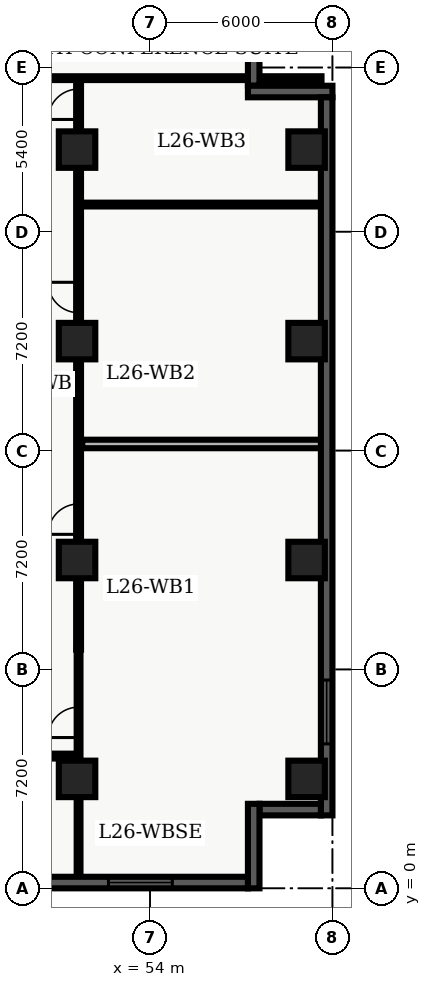
"""IFC4 building model, lengths in metres.
Left out: names, types, materials, properties, quantities, classifications, styles, units other than length and angle.
Written with IfcOpenShell. Run it as: python <this file> out.ifc"""

import sys

from ifc_helpers import new_model, entity, si_unit, converted_unit, direction, frame, origin_with_axes, origin_2d_with_axis, place, context, subcontext, project, spatial, polyline, rectangle, outline, extrude, element, fill, save


model = new_model("IFC4")
c1 = context("Model", 3, precision=1e-05, world=origin_with_axes(), true_north=direction((0.0, 1.0)))
c2 = subcontext(c1, "Body", "Model", "MODEL_VIEW")
j1 = project(units=[si_unit("LENGTHUNIT", "METRE"), converted_unit("PLANEANGLEUNIT", "DEGREE", entity("IfcPlaneAngleMeasure", 0.017), si_unit("PLANEANGLEUNIT", "RADIAN"), dimensions=[0, 0, 0, 0, 0, 0, 0])], contexts=[c1])
p1 = place(None, origin_with_axes())
s1 = spatial("IfcSite", under=j1, at=p1, CompositionType="ELEMENT")
p2 = place(p1, origin_with_axes())
s2 = spatial("IfcBuilding", under=s1, at=p2, CompositionType="ELEMENT")
p3 = place(p2, frame((0.0, 0.0, 108.6), z_axis=(0.0, 0.0, 1.0), x_axis=(1.0, 0.0, 0.0)))
s3 = spatial("IfcBuildingStorey", under=s2, at=p3, CompositionType="ELEMENT", Elevation=108.6)
for number, where, z_axis, x_axis in (
    (1, (51.6, 3.6, 0.0), (0.0, 0.0, 1.0), (1.0, 0.0, 0.0)),
    (2, (51.6, 10.8, 0.0), (0.0, 0.0, 1.0), (1.0, 0.0, 0.0)),
    (3, (51.6, 18.0, 0.0), (0.0, 0.0, 1.0), (1.0, 0.0, 0.0)),
    (4, (51.6, 24.3, 0.0), (0.0, 0.0, 1.0), (1.0, 0.0, 0.0)),
    (5, (59.15, 3.6, 0.0), (0.0, 0.0, 1.0), (1.0, 0.0, 0.0)),
    (6, (59.15, 10.8, 0.0), (0.0, 0.0, 1.0), (1.0, 0.0, 0.0)),
    (7, (59.15, 18.0, 0.0), (0.0, 0.0, 1.0), (1.0, 0.0, 0.0)),
    (8, (59.15, 24.3, 0.0), (0.0, 0.0, 1.0), (1.0, 0.0, 0.0)),
):
    element("IfcColumn", number, at=place(p3, frame(where, z_axis=z_axis, x_axis=x_axis)), inside=s3, PredefinedType="COLUMN", context=c2, shape_type="SweptSolid", body=[
        extrude(rectangle(XDim=1.2, YDim=1.2, at=origin_2d_with_axis()), origin_with_axes(), (0.0, 0.0, 1.0), 3.9),
    ])
p4 = place(p3, frame((51.65, 7.85, 0.0), z_axis=(0.0, 0.0, 1.0), x_axis=(0.0, 1.0, 0.0)))
e9 = element("IfcWall", 9, at=p4, inside=s3, PredefinedType="PARTITIONING", context=c2, shape_type="SweptSolid", body=[
    extrude(outline(polyline([(0.0, -0.08), (18.8, -0.08), (18.8, 0.08), (0.0, 0.08), (0.0, -0.08)])), origin_with_axes(), (0.0, 0.0, 1.0), 2.7),
])
p5 = place(p4, frame((4.294, 0.0, 0.0), z_axis=(0.0, 0.0, 1.0), x_axis=(1.0, 0.0, 0.0)))
e10 = element("IfcOpeningElement", 10, at=p5, cuts=e9, PredefinedType="OPENING", context=c2, shape_type="SweptSolid", body=[
    extrude(rectangle(XDim=1.0, YDim=0.18, at=origin_2d_with_axis()), origin_with_axes(), (0.0, 0.0, 1.0), 2.15),
])
p6 = place(p4, frame((11.585, 0.0, 0.0), z_axis=(0.0, 0.0, 1.0), x_axis=(1.0, 0.0, 0.0)))
e11 = element("IfcOpeningElement", 11, at=p6, cuts=e9, PredefinedType="OPENING", context=c2, shape_type="SweptSolid", body=[
    extrude(rectangle(XDim=1.0, YDim=0.18, at=origin_2d_with_axis()), origin_with_axes(), (0.0, 0.0, 1.0), 2.15),
])
p7 = place(p4, frame((17.941, 0.0, 0.0), z_axis=(0.0, 0.0, 1.0), x_axis=(1.0, 0.0, 0.0)))
e12 = element("IfcOpeningElement", 12, at=p7, cuts=e9, PredefinedType="OPENING", context=c2, shape_type="SweptSolid", body=[
    extrude(rectangle(XDim=1.0, YDim=0.18, at=origin_2d_with_axis()), origin_with_axes(), (0.0, 0.0, 1.0), 2.15),
])
p8 = place(p3, frame((38.76, 26.65, 0.0), z_axis=(0.0, 0.0, 1.0), x_axis=(1.0, 0.0, 0.0)))
e13 = element("IfcWall", 13, at=p8, inside=s3, PredefinedType="PARTITIONING", context=c2, shape_type="SweptSolid", body=[
    extrude(outline(polyline([(0.0, -0.062), (20.88, -0.062), (20.88, 0.062), (0.0, 0.062), (0.0, -0.062)])), origin_with_axes(), (0.0, 0.0, 1.0), 2.7),
])
p9 = place(p8, frame((4.24, 0.0, 0.0), z_axis=(0.0, 0.0, 1.0), x_axis=(1.0, 0.0, 0.0)))
e14 = element("IfcOpeningElement", 14, at=p9, cuts=e13, PredefinedType="OPENING", context=c2, shape_type="SweptSolid", body=[
    extrude(rectangle(XDim=1.0, YDim=0.145, at=origin_2d_with_axis()), origin_with_axes(), (0.0, 0.0, 1.0), 2.15),
])
p10 = place(p3, frame((44.55, 4.35, 0.0), z_axis=(0.0, 0.0, 1.0), x_axis=(1.0, 0.0, 0.0)))
e15 = element("IfcWall", 15, at=p10, inside=s3, PredefinedType="PARTITIONING", context=c2, shape_type="SweptSolid", body=[
    extrude(outline(polyline([(0.0, -0.08), (7.1, -0.08), (7.1, 0.08), (0.0, 0.08), (0.0, -0.08)])), origin_with_axes(), (0.0, 0.0, 1.0), 2.7),
])
p11 = place(p10, frame((1.7, 0.0, 0.0), z_axis=(0.0, 0.0, 1.0), x_axis=(1.0, 0.0, 0.0)))
e16 = element("IfcOpeningElement", 16, at=p11, cuts=e15, PredefinedType="OPENING", context=c2, shape_type="SweptSolid", body=[
    extrude(rectangle(XDim=1.0, YDim=0.18, at=origin_2d_with_axis()), origin_with_axes(), (0.0, 0.0, 1.0), 2.15),
])
p12 = place(p3, frame((51.65, 0.36, 0.0), z_axis=(0.0, 0.0, 1.0), x_axis=(0.0, 1.0, 0.0)))
e17 = element("IfcWall", 17, at=p12, inside=s3, PredefinedType="PARTITIONING", context=c2, shape_type="SweptSolid", body=[
    extrude(outline(polyline([(0.0, -0.062), (7.49, -0.062), (7.49, 0.062), (0.0, 0.062), (0.0, -0.062)])), origin_with_axes(), (0.0, 0.0, 1.0), 2.7),
])
p13 = place(p12, frame((5.1, 0.0, 0.0), z_axis=(0.0, 0.0, 1.0), x_axis=(1.0, 0.0, 0.0)))
e18 = element("IfcOpeningElement", 18, at=p13, cuts=e17, PredefinedType="OPENING", context=c2, shape_type="SweptSolid", body=[
    extrude(rectangle(XDim=1.0, YDim=0.145, at=origin_2d_with_axis()), origin_with_axes(), (0.0, 0.0, 1.0), 2.15),
])
p14 = place(p3, frame((51.77, 14.617, 0.0), z_axis=(0.0, 0.0, 1.0), x_axis=(1.0, 0.0, 0.0)))
e19 = element("IfcWall", 19, at=p14, inside=s3, PredefinedType="PARTITIONING", context=c2, shape_type="SweptSolid", body=[
    extrude(outline(polyline([(0.0, -0.14), (7.855, -0.14), (7.855, 0.14), (0.0, 0.14), (0.0, -0.14)])), origin_with_axes(), (0.0, 0.0, 1.0), 2.7),
])
p15 = place(p3, frame((51.77, 22.492, 0.0), z_axis=(0.0, 0.0, 1.0), x_axis=(1.0, 0.0, 0.0)))
e20 = element("IfcWall", 20, at=p15, inside=s3, PredefinedType="PARTITIONING", context=c2, shape_type="SweptSolid", body=[
    extrude(outline(polyline([(0.0, -0.062), (7.855, -0.062), (7.855, 0.062), (0.0, 0.062), (0.0, -0.062)])), origin_with_axes(), (0.0, 0.0, 1.0), 2.7),
])
p16 = place(p3, frame((57.41, 28.42, 0.0), z_axis=(0.0, 0.0, 1.0), x_axis=(0.0, -1.0, 0.0)))
e21 = element("IfcWall", 21, at=p16, inside=s3, PredefinedType="SOLIDWALL", context=c2, shape_type="SweptSolid", body=[
    extrude(outline(polyline([(0.0, -0.19), (2.02, -0.19), (2.02, 0.19), (0.0, 0.19), (0.0, -0.19)])), origin_with_axes(), (0.0, 0.0, 1.0), 3.66),
])
p17 = place(p3, frame((57.22, 26.21, 0.0), z_axis=(0.0, 0.0, 1.0), x_axis=(1.0, 0.0, 0.0)))
e22 = element("IfcWall", 22, at=p17, inside=s3, PredefinedType="SOLIDWALL", context=c2, shape_type="SweptSolid", body=[
    extrude(outline(polyline([(0.0, -0.19), (2.78, -0.19), (2.78, 0.19), (0.0, 0.19), (0.0, -0.19)])), origin_with_axes(), (0.0, 0.0, 1.0), 3.66),
])
p18 = place(p3, frame((59.81, 26.02, 0.0), z_axis=(0.0, 0.0, 1.0), x_axis=(0.0, -1.0, 0.0)))
e23 = element("IfcWall", 23, at=p18, inside=s3, PredefinedType="SOLIDWALL", context=c2, shape_type="SweptSolid", body=[
    extrude(outline(polyline([(0.0, -0.19), (23.62, -0.19), (23.62, 0.19), (0.0, 0.19), (0.0, -0.19)])), origin_with_axes(), (0.0, 0.0, 1.0), 3.66),
])
p19 = place(p18, frame((20.218, 0.0, 0.45), z_axis=(0.0, 0.0, 1.0), x_axis=(1.0, 0.0, 0.0)))
e24 = element("IfcOpeningElement", 24, at=p19, cuts=e23, PredefinedType="OPENING", context=c2, shape_type="SweptSolid", body=[
    extrude(rectangle(XDim=2.1, YDim=0.4, at=origin_2d_with_axis()), origin_with_axes(), (0.0, 0.0, 1.0), 2.2),
])
p20 = place(p3, frame((59.62, 2.59, 0.0), z_axis=(0.0, 0.0, 1.0), x_axis=(-1.0, 0.0, 0.0)))
e25 = element("IfcWall", 25, at=p20, inside=s3, PredefinedType="SOLIDWALL", context=c2, shape_type="SweptSolid", body=[
    extrude(outline(polyline([(0.0, -0.19), (2.02, -0.19), (2.02, 0.19), (0.0, 0.19), (0.0, -0.19)])), origin_with_axes(), (0.0, 0.0, 1.0), 3.66),
])
p21 = place(p3, frame((57.41, 2.78, 0.0), z_axis=(0.0, 0.0, 1.0), x_axis=(0.0, -1.0, 0.0)))
e26 = element("IfcWall", 26, at=p21, inside=s3, PredefinedType="SOLIDWALL", context=c2, shape_type="SweptSolid", body=[
    extrude(outline(polyline([(0.0, -0.19), (2.78, -0.19), (2.78, 0.19), (0.0, 0.19), (0.0, -0.19)])), origin_with_axes(), (0.0, 0.0, 1.0), 3.66),
])
p22 = place(p3, frame((57.22, 0.19, 0.0), z_axis=(0.0, 0.0, 1.0), x_axis=(-1.0, 0.0, 0.0)))
e27 = element("IfcWall", 27, at=p22, inside=s3, PredefinedType="SOLIDWALL", context=c2, shape_type="SweptSolid", body=[
    extrude(outline(polyline([(0.0, -0.19), (18.82, -0.19), (18.82, 0.19), (0.0, 0.19), (0.0, -0.19)])), origin_with_axes(), (0.0, 0.0, 1.0), 3.66),
])
p23 = place(p22, frame((3.537, 0.0, 0.45), z_axis=(0.0, 0.0, 1.0), x_axis=(1.0, 0.0, 0.0)))
e28 = element("IfcOpeningElement", 28, at=p23, cuts=e27, PredefinedType="OPENING", context=c2, shape_type="SweptSolid", body=[
    extrude(rectangle(XDim=2.1, YDim=0.4, at=origin_2d_with_axis()), origin_with_axes(), (0.0, 0.0, 1.0), 2.2),
])
p24 = place(p22, frame((9.41, 0.0, 0.45), z_axis=(0.0, 0.0, 1.0), x_axis=(1.0, 0.0, 0.0)))
e29 = element("IfcOpeningElement", 29, at=p24, cuts=e27, PredefinedType="OPENING", context=c2, shape_type="SweptSolid", body=[
    extrude(rectangle(XDim=2.1, YDim=0.4, at=origin_2d_with_axis()), origin_with_axes(), (0.0, 0.0, 1.0), 2.2),
])
p25 = place(p22, frame((15.283, 0.0, 0.45), z_axis=(0.0, 0.0, 1.0), x_axis=(1.0, 0.0, 0.0)))
e30 = element("IfcOpeningElement", 30, at=p25, cuts=e27, PredefinedType="OPENING", context=c2, shape_type="SweptSolid", body=[
    extrude(rectangle(XDim=2.1, YDim=0.4, at=origin_2d_with_axis()), origin_with_axes(), (0.0, 0.0, 1.0), 2.2),
])
p26 = place(p12, frame((5.1, 0.0, 0.0), z_axis=(0.0, 0.0, 1.0), x_axis=(1.0, 0.0, 0.0)))
e31 = element("IfcDoor", 31, at=p26, inside=s3, OperationType="SINGLE_SWING_LEFT", PredefinedType="DOOR", context=c2, shape_type="SweptSolid", body=[
    extrude(rectangle(XDim=1.0, YDim=0.075, at=origin_2d_with_axis()), origin_with_axes(), (0.0, 0.0, 1.0), 2.15),
])
fill(e18, e31)
p27 = place(p4, frame((4.294, 0.0, 0.0), z_axis=(0.0, 0.0, 1.0), x_axis=(1.0, 0.0, 0.0)))
e32 = element("IfcDoor", 32, at=p27, inside=s3, OperationType="SINGLE_SWING_LEFT", PredefinedType="DOOR", context=c2, shape_type="SweptSolid", body=[
    extrude(rectangle(XDim=1.0, YDim=0.09, at=origin_2d_with_axis()), origin_with_axes(), (0.0, 0.0, 1.0), 2.15),
])
fill(e10, e32)
p28 = place(p4, frame((11.585, 0.0, 0.0), z_axis=(0.0, 0.0, 1.0), x_axis=(1.0, 0.0, 0.0)))
e33 = element("IfcDoor", 33, at=p28, inside=s3, OperationType="SINGLE_SWING_RIGHT", PredefinedType="DOOR", context=c2, shape_type="SweptSolid", body=[
    extrude(rectangle(XDim=1.0, YDim=0.09, at=origin_2d_with_axis()), origin_with_axes(), (0.0, 0.0, 1.0), 2.15),
])
fill(e11, e33)
p29 = place(p4, frame((17.941, 0.0, 0.0), z_axis=(0.0, 0.0, 1.0), x_axis=(1.0, 0.0, 0.0)))
e34 = element("IfcDoor", 34, at=p29, inside=s3, OperationType="SINGLE_SWING_LEFT", PredefinedType="DOOR", context=c2, shape_type="SweptSolid", body=[
    extrude(rectangle(XDim=1.0, YDim=0.09, at=origin_2d_with_axis()), origin_with_axes(), (0.0, 0.0, 1.0), 2.15),
])
fill(e12, e34)
p30 = place(p18, frame((20.218, 0.0, 0.45), z_axis=(0.0, 0.0, 1.0), x_axis=(1.0, 0.0, 0.0)))
e35 = element("IfcWindow", 35, at=p30, inside=s3, PredefinedType="WINDOW", context=c2, shape_type="SweptSolid", body=[
    extrude(rectangle(XDim=2.1, YDim=0.09, at=origin_2d_with_axis()), origin_with_axes(), (0.0, 0.0, 1.0), 2.2),
])
fill(e24, e35)
p31 = place(p22, frame((3.537, 0.0, 0.45), z_axis=(0.0, 0.0, 1.0), x_axis=(1.0, 0.0, 0.0)))
e36 = element("IfcWindow", 36, at=p31, inside=s3, PredefinedType="WINDOW", context=c2, shape_type="SweptSolid", body=[
    extrude(rectangle(XDim=2.1, YDim=0.09, at=origin_2d_with_axis()), origin_with_axes(), (0.0, 0.0, 1.0), 2.2),
])
fill(e28, e36)
save(model, sys.argv[1])
